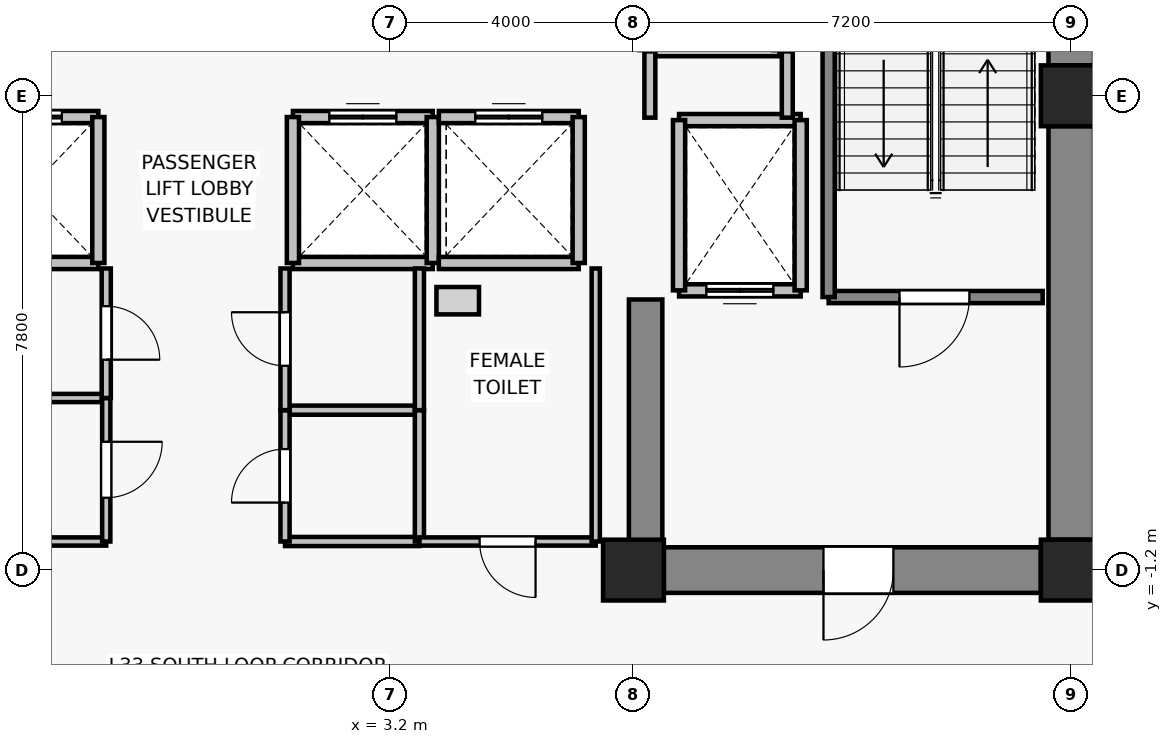
"""IFC4 building model, lengths in metres.
Left out: names, types, materials, properties, quantities, classifications, styles, units other than length and angle.
Written with IfcOpenShell. Run it as: python <this file> out.ifc"""

import sys

from ifc_helpers import new_model, si_unit, direction, frame, frame_2d, origin, origin_2d, place, context, subcontext, project, spatial, rectangle, extrude, source, transform, mapped, element, fill, save


model = new_model("IFC4")
c1 = context("Model", 3, precision=1e-05, world=origin(), true_north=direction((0.0, 1.0)))
c2 = subcontext(c1, "Body", "Model", "MODEL_VIEW")
j1 = project(units=[si_unit("LENGTHUNIT", "METRE"), si_unit("PLANEANGLEUNIT", "RADIAN")], contexts=[c1])
p1 = place(None, origin())
s1 = spatial("IfcSite", under=j1, at=p1, CompositionType="ELEMENT")
p2 = place(p1, origin())
s2 = spatial("IfcBuilding", under=s1, at=p2, CompositionType="ELEMENT")
p3 = place(p2, frame((0.0, 0.0, 119.8)))
s3 = spatial("IfcBuildingStorey", under=s2, at=p3, CompositionType="ELEMENT", Elevation=119.8)
for number, where, z_axis, x_axis in (
    (1, (7.2, -1.2, 0.0), (0.0, 0.0, 1.0), (1.0, 0.0, 0.0)),
    (2, (14.4, -1.2, 0.0), (0.0, 0.0, 1.0), (1.0, 0.0, 0.0)),
    (3, (14.4, 6.6, 0.0), (0.0, 0.0, 1.0), (1.0, 0.0, 0.0)),
):
    element("IfcColumn", number, at=place(p3, frame(where, z_axis=z_axis, x_axis=x_axis)), inside=s3, PredefinedType="COLUMN", context=c2, shape_type="SweptSolid", body=[
        extrude(rectangle(XDim=1.0, YDim=1.0, at=origin_2d()), origin(), (0.0, 0.0, 1.0), 3.3),
    ])
p4 = place(p3, frame((14.4, -0.7, 0.0), z_axis=(0.0, 0.0, 1.0), x_axis=(0.0, 1.0, 0.0)))
e4 = element("IfcWall", 4, at=p4, inside=s3, PredefinedType="SHEAR", context=c2, shape_type="SweptSolid", body=[
    extrude(rectangle(XDim=6.8, YDim=0.75, at=frame_2d((3.4, 0.0))), origin(), (0.0, 0.0, 1.0), 3.075),
])
p5 = place(p3, frame((14.4, 7.1, 0.0), z_axis=(0.0, 0.0, 1.0), x_axis=(0.0, 1.0, 0.0)))
e5 = element("IfcWall", 5, at=p5, inside=s3, PredefinedType="SHEAR", context=c2, shape_type="SweptSolid", body=[
    extrude(rectangle(XDim=5.9, YDim=0.75, at=frame_2d((2.95, 0.0))), origin(), (0.0, 0.0, 1.0), 3.075),
])
p6 = place(p3, frame((13.9, -1.2, 0.0), z_axis=(0.0, 0.0, 1.0), x_axis=(-1.0, 0.0, 0.0)))
e6 = element("IfcWall", 6, at=p6, inside=s3, PredefinedType="SHEAR", context=c2, shape_type="SweptSolid", body=[
    extrude(rectangle(XDim=6.2, YDim=0.75, at=frame_2d((3.1, 0.0))), origin(), (0.0, 0.0, 1.0), 3.075),
])
p7 = place(p6, frame((2.425, 0.0, 0.0)))
e7 = element("IfcOpeningElement", 7, at=p7, cuts=e6, PredefinedType="OPENING", context=c2, shape_type="SweptSolid", body=[
    extrude(rectangle(XDim=1.15, YDim=2.15, at=frame_2d((0.575, 1.075))), frame((0.0, 0.385, 0.0), z_axis=(0.0, -1.0, 0.0), x_axis=(1.0, 0.0, 0.0)), (0.0, 0.0, 1.0), 0.77),
])
p8 = place(p3, frame((7.4, -0.825, 0.0), z_axis=(0.0, 0.0, 1.0), x_axis=(0.0, 1.0, 0.0)))
e8 = element("IfcWall", 8, at=p8, inside=s3, PredefinedType="SHEAR", context=c2, shape_type="SweptSolid", body=[
    extrude(rectangle(XDim=4.075, YDim=0.55, at=frame_2d((2.038, 0.0))), origin(), (0.0, 0.0, 1.0), 3.075),
])
p9 = place(p3, frame((9.95, 3.4, 0.0), z_axis=(0.0, 0.0, 1.0), x_axis=(-1.0, 0.0, 0.0)))
e9 = element("IfcWall", 9, at=p9, inside=s3, PredefinedType="SOLIDWALL", context=c2, shape_type="SweptSolid", body=[
    extrude(rectangle(XDim=2.0, YDim=0.2, at=frame_2d((1.0, 0.0))), origin(), (0.0, 0.0, 1.0), 3.075),
])
p10 = place(p9, frame((0.45, 0.0, 0.0)))
e10 = element("IfcOpeningElement", 10, at=p10, cuts=e9, PredefinedType="OPENING", context=c2, shape_type="SweptSolid", body=[
    extrude(rectangle(XDim=1.1, YDim=2.2, at=frame_2d((0.55, 1.1))), frame((0.0, 0.11, 0.0), z_axis=(0.0, -1.0, 0.0), x_axis=(1.0, 0.0, 0.0)), (0.0, 0.0, 1.0), 0.22),
])
p11 = place(p3, frame((7.95, 6.2, 0.0), z_axis=(0.0, 0.0, 1.0), x_axis=(1.0, 0.0, 0.0)))
e11 = element("IfcWall", 11, at=p11, inside=s3, PredefinedType="SOLIDWALL", context=c2, shape_type="SweptSolid", body=[
    extrude(rectangle(XDim=2.0, YDim=0.2, at=frame_2d((1.0, 0.0))), origin(), (0.0, 0.0, 1.0), 3.075),
])
for number, where, z_axis, x_axis in (
    (12, (7.95, 3.4, 0.0), (0.0, 0.0, 1.0), (0.0, 1.0, 0.0)),
    (13, (9.95, 6.2, 0.0), (0.0, 0.0, 1.0), (0.0, -1.0, 0.0)),
):
    element("IfcWall", number, at=place(p3, frame(where, z_axis=z_axis, x_axis=x_axis)), inside=s3, PredefinedType="SOLIDWALL", context=c2, shape_type="SweptSolid", body=[
        extrude(rectangle(XDim=2.8, YDim=0.2, at=frame_2d((1.4, 0.0))), origin(), (0.0, 0.0, 1.0), 3.075),
    ])
p12 = place(p3, frame((-1.6, 3.85, 0.0), z_axis=(0.0, 0.0, 1.0), x_axis=(-1.0, 0.0, 0.0)))
e14 = element("IfcWall", 14, at=p12, inside=s3, PredefinedType="SOLIDWALL", context=c2, shape_type="SweptSolid", body=[
    extrude(rectangle(XDim=2.3, YDim=0.2, at=frame_2d((1.15, 0.0))), origin(), (0.0, 0.0, 1.0), 3.075),
])
p13 = place(p3, frame((-3.9, 6.25, 0.0), z_axis=(0.0, 0.0, 1.0), x_axis=(1.0, 0.0, 0.0)))
e15 = element("IfcWall", 15, at=p13, inside=s3, PredefinedType="SOLIDWALL", context=c2, shape_type="SweptSolid", body=[
    extrude(rectangle(XDim=2.3, YDim=0.2, at=frame_2d((1.15, 0.0))), origin(), (0.0, 0.0, 1.0), 3.075),
])
p14 = place(p13, frame((0.6, 0.0, 0.0)))
e16 = element("IfcOpeningElement", 16, at=p14, cuts=e15, PredefinedType="OPENING", context=c2, shape_type="SweptSolid", body=[
    extrude(rectangle(XDim=1.1, YDim=2.2, at=frame_2d((0.55, 1.1))), frame((0.0, 0.11, 0.0), z_axis=(0.0, -1.0, 0.0), x_axis=(1.0, 0.0, 0.0)), (0.0, 0.0, 1.0), 0.22),
])
p15 = place(p3, frame((-1.6, 6.25, 0.0), z_axis=(0.0, 0.0, 1.0), x_axis=(0.0, -1.0, 0.0)))
e17 = element("IfcWall", 17, at=p15, inside=s3, PredefinedType="SOLIDWALL", context=c2, shape_type="SweptSolid", body=[
    extrude(rectangle(XDim=2.4, YDim=0.2, at=frame_2d((1.2, 0.0))), origin(), (0.0, 0.0, 1.0), 3.075),
])
p16 = place(p3, frame((3.9, 3.85, 0.0), z_axis=(0.0, 0.0, 1.0), x_axis=(-1.0, 0.0, 0.0)))
e18 = element("IfcWall", 18, at=p16, inside=s3, PredefinedType="SOLIDWALL", context=c2, shape_type="SweptSolid", body=[
    extrude(rectangle(XDim=2.3, YDim=0.2, at=frame_2d((1.15, 0.0))), origin(), (0.0, 0.0, 1.0), 3.075),
])
p17 = place(p3, frame((1.6, 6.25, 0.0), z_axis=(0.0, 0.0, 1.0), x_axis=(1.0, 0.0, 0.0)))
e19 = element("IfcWall", 19, at=p17, inside=s3, PredefinedType="SOLIDWALL", context=c2, shape_type="SweptSolid", body=[
    extrude(rectangle(XDim=2.3, YDim=0.2, at=frame_2d((1.15, 0.0))), origin(), (0.0, 0.0, 1.0), 3.075),
])
p18 = place(p17, frame((0.6, 0.0, 0.0)))
e20 = element("IfcOpeningElement", 20, at=p18, cuts=e19, PredefinedType="OPENING", context=c2, shape_type="SweptSolid", body=[
    extrude(rectangle(XDim=1.1, YDim=2.2, at=frame_2d((0.55, 1.1))), frame((0.0, 0.11, 0.0), z_axis=(0.0, -1.0, 0.0), x_axis=(1.0, 0.0, 0.0)), (0.0, 0.0, 1.0), 0.22),
])
for number, where, z_axis, x_axis in (
    (21, (1.6, 3.85, 0.0), (0.0, 0.0, 1.0), (0.0, 1.0, 0.0)),
    (22, (3.9, 6.25, 0.0), (0.0, 0.0, 1.0), (0.0, -1.0, 0.0)),
):
    element("IfcWall", number, at=place(p3, frame(where, z_axis=z_axis, x_axis=x_axis)), inside=s3, PredefinedType="SOLIDWALL", context=c2, shape_type="SweptSolid", body=[
        extrude(rectangle(XDim=2.4, YDim=0.2, at=frame_2d((1.2, 0.0))), origin(), (0.0, 0.0, 1.0), 3.075),
    ])
p19 = place(p3, frame((6.3, 3.85, 0.0), z_axis=(0.0, 0.0, 1.0), x_axis=(-1.0, 0.0, 0.0)))
e23 = element("IfcWall", 23, at=p19, inside=s3, PredefinedType="SOLIDWALL", context=c2, shape_type="SweptSolid", body=[
    extrude(rectangle(XDim=2.3, YDim=0.2, at=frame_2d((1.15, 0.0))), origin(), (0.0, 0.0, 1.0), 3.075),
])
p20 = place(p3, frame((4.0, 6.25, 0.0), z_axis=(0.0, 0.0, 1.0), x_axis=(1.0, 0.0, 0.0)))
e24 = element("IfcWall", 24, at=p20, inside=s3, PredefinedType="SOLIDWALL", context=c2, shape_type="SweptSolid", body=[
    extrude(rectangle(XDim=2.3, YDim=0.2, at=frame_2d((1.15, 0.0))), origin(), (0.0, 0.0, 1.0), 3.075),
])
p21 = place(p20, frame((0.6, 0.0, 0.0)))
e25 = element("IfcOpeningElement", 25, at=p21, cuts=e24, PredefinedType="OPENING", context=c2, shape_type="SweptSolid", body=[
    extrude(rectangle(XDim=1.1, YDim=2.2, at=frame_2d((0.55, 1.1))), frame((0.0, 0.11, 0.0), z_axis=(0.0, -1.0, 0.0), x_axis=(1.0, 0.0, 0.0)), (0.0, 0.0, 1.0), 0.22),
])
p22 = place(p3, frame((6.3, 6.25, 0.0), z_axis=(0.0, 0.0, 1.0), x_axis=(0.0, -1.0, 0.0)))
e26 = element("IfcWall", 26, at=p22, inside=s3, PredefinedType="SOLIDWALL", context=c2, shape_type="SweptSolid", body=[
    extrude(rectangle(XDim=2.4, YDim=0.2, at=frame_2d((1.2, 0.0))), origin(), (0.0, 0.0, 1.0), 3.075),
])
p23 = place(p3, frame((9.6, 7.35, 0.0), z_axis=(0.0, 0.0, 1.0), x_axis=(-1.0, 0.0, 0.0)))
e27 = element("IfcWall", 27, at=p23, inside=s3, PredefinedType="SOLIDWALL", context=c2, shape_type="SweptSolid", body=[
    extrude(rectangle(XDim=2.2, YDim=0.2, at=frame_2d((1.1, 0.0))), origin(), (0.0, 0.0, 1.0), 2.515),
])
p24 = place(p3, frame((13.93, 3.29, 0.0), z_axis=(0.0, 0.0, 1.0), x_axis=(-1.0, 0.0, 0.0)))
e28 = element("IfcWall", 28, at=p24, inside=s3, PredefinedType="SOLIDWALL", context=c2, shape_type="SweptSolid", body=[
    extrude(rectangle(XDim=3.52, YDim=0.2, at=frame_2d((1.76, 0.0))), origin(), (0.0, 0.0, 1.0), 3.075),
])
p25 = place(p24, frame((1.205, 0.0, 0.0)))
e29 = element("IfcOpeningElement", 29, at=p25, cuts=e28, PredefinedType="OPENING", context=c2, shape_type="SweptSolid", body=[
    extrude(rectangle(XDim=1.15, YDim=2.15, at=frame_2d((0.575, 1.075))), frame((0.0, 0.11, 0.0), z_axis=(0.0, -1.0, 0.0), x_axis=(1.0, 0.0, 0.0)), (0.0, 0.0, 1.0), 0.22),
])
p26 = place(p3, frame((10.41, 3.29, 0.0), z_axis=(0.0, 0.0, 1.0), x_axis=(0.0, 1.0, 0.0)))
e30 = element("IfcWall", 30, at=p26, inside=s3, PredefinedType="SOLIDWALL", context=c2, shape_type="SweptSolid", body=[
    extrude(rectangle(XDim=8.84, YDim=0.2, at=frame_2d((4.42, 0.0))), origin(), (0.0, 0.0, 1.0), 3.075),
])
p27 = place(p3, frame((7.47, 6.24, 0.0), z_axis=(0.0, 0.0, 1.0), x_axis=(0.0, 1.0, 0.0)))
e31 = element("IfcWall", 31, at=p27, inside=s3, PredefinedType="PARTITIONING", context=c2, shape_type="SweptSolid", body=[
    extrude(rectangle(XDim=1.09, YDim=0.18, at=frame_2d((0.545, 0.0))), origin(), (0.0, 0.0, 1.0), 2.515),
])
p28 = place(p3, frame((9.73, 7.33, 0.0), z_axis=(0.0, 0.0, 1.0), x_axis=(0.0, -1.0, 0.0)))
e32 = element("IfcWall", 32, at=p28, inside=s3, PredefinedType="PARTITIONING", context=c2, shape_type="SweptSolid", body=[
    extrude(rectangle(XDim=1.09, YDim=0.18, at=frame_2d((0.545, 0.0))), origin(), (0.0, 0.0, 1.0), 3.075),
])
for number, where, z_axis, x_axis in (
    (33, (-1.47, -0.73, 0.0), (0.0, 0.0, 1.0), (-1.0, 0.0, 0.0)),
    (34, (-3.47, 1.63, 0.0), (0.0, 0.0, 1.0), (1.0, 0.0, 0.0)),
):
    element("IfcWall", number, at=place(p3, frame(where, z_axis=z_axis, x_axis=x_axis)), inside=s3, PredefinedType="PARTITIONING", context=c2, shape_type="SweptSolid", body=[
        extrude(rectangle(XDim=2.0, YDim=0.135, at=frame_2d((1.0, 0.0))), origin(), (0.0, 0.0, 1.0), 3.075),
    ])
p29 = place(p3, frame((-1.47, 1.63, 0.0), z_axis=(0.0, 0.0, 1.0), x_axis=(0.0, -1.0, 0.0)))
e35 = element("IfcWall", 35, at=p29, inside=s3, PredefinedType="PARTITIONING", context=c2, shape_type="SweptSolid", body=[
    extrude(rectangle(XDim=2.36, YDim=0.135, at=frame_2d((1.18, 0.0))), origin(), (0.0, 0.0, 1.0), 3.075),
])
p30 = place(p29, frame((0.72, 0.0, 0.0)))
e36 = element("IfcOpeningElement", 36, at=p30, cuts=e35, PredefinedType="OPENING", context=c2, shape_type="SweptSolid", body=[
    extrude(rectangle(XDim=0.92, YDim=2.1, at=frame_2d((0.46, 1.05))), frame((0.0, 0.077, 0.0), z_axis=(0.0, -1.0, 0.0), x_axis=(1.0, 0.0, 0.0)), (0.0, 0.0, 1.0), 0.155),
])
p31 = place(p3, frame((-1.47, 3.76, 0.0), z_axis=(0.0, 0.0, 1.0), x_axis=(0.0, -1.0, 0.0)))
e37 = element("IfcWall", 37, at=p31, inside=s3, PredefinedType="PARTITIONING", context=c2, shape_type="SweptSolid", body=[
    extrude(rectangle(XDim=2.13, YDim=0.15, at=frame_2d((1.065, 0.0))), origin(), (0.0, 0.0, 1.0), 3.075),
])
p32 = place(p31, frame((0.62, 0.0, 0.0)))
e38 = element("IfcOpeningElement", 38, at=p32, cuts=e37, PredefinedType="OPENING", context=c2, shape_type="SweptSolid", body=[
    extrude(rectangle(XDim=0.88, YDim=2.1, at=frame_2d((0.44, 1.05))), frame((0.0, 0.085, 0.0), z_axis=(0.0, -1.0, 0.0), x_axis=(1.0, 0.0, 0.0)), (0.0, 0.0, 1.0), 0.17),
])
for number, where, z_axis, x_axis in (
    (39, (3.68, -0.73, 0.0), (0.0, 0.0, 1.0), (-1.0, 0.0, 0.0)),
    (40, (1.47, 1.43, 0.0), (0.0, 0.0, 1.0), (1.0, 0.0, 0.0)),
):
    element("IfcWall", number, at=place(p3, frame(where, z_axis=z_axis, x_axis=x_axis)), inside=s3, PredefinedType="PARTITIONING", context=c2, shape_type="SweptSolid", body=[
        extrude(rectangle(XDim=2.21, YDim=0.15, at=frame_2d((1.105, 0.0))), origin(), (0.0, 0.0, 1.0), 3.075),
    ])
p33 = place(p3, frame((1.47, -0.73, 0.0), z_axis=(0.0, 0.0, 1.0), x_axis=(0.0, 1.0, 0.0)))
e41 = element("IfcWall", 41, at=p33, inside=s3, PredefinedType="PARTITIONING", context=c2, shape_type="SweptSolid", body=[
    extrude(rectangle(XDim=2.16, YDim=0.15, at=frame_2d((1.08, 0.0))), origin(), (0.0, 0.0, 1.0), 3.075),
])
p34 = place(p33, frame((0.64, 0.0, 0.0)))
e42 = element("IfcOpeningElement", 42, at=p34, cuts=e41, PredefinedType="OPENING", context=c2, shape_type="SweptSolid", body=[
    extrude(rectangle(XDim=0.88, YDim=2.1, at=frame_2d((0.44, 1.05))), frame((0.0, 0.085, 0.0), z_axis=(0.0, -1.0, 0.0), x_axis=(1.0, 0.0, 0.0)), (0.0, 0.0, 1.0), 0.17),
])
p35 = place(p3, frame((3.68, 1.43, 0.0), z_axis=(0.0, 0.0, 1.0), x_axis=(0.0, -1.0, 0.0)))
e43 = element("IfcWall", 43, at=p35, inside=s3, PredefinedType="PARTITIONING", context=c2, shape_type="SweptSolid", body=[
    extrude(rectangle(XDim=2.16, YDim=0.15, at=frame_2d((1.08, 0.0))), origin(), (0.0, 0.0, 1.0), 3.075),
])
p36 = place(p3, frame((1.47, 1.43, 0.0), z_axis=(0.0, 0.0, 1.0), x_axis=(0.0, 1.0, 0.0)))
e44 = element("IfcWall", 44, at=p36, inside=s3, PredefinedType="PARTITIONING", context=c2, shape_type="SweptSolid", body=[
    extrude(rectangle(XDim=2.33, YDim=0.15, at=frame_2d((1.165, 0.0))), origin(), (0.0, 0.0, 1.0), 3.075),
])
p37 = place(p36, frame((0.73, 0.0, 0.0)))
e45 = element("IfcOpeningElement", 45, at=p37, cuts=e44, PredefinedType="OPENING", context=c2, shape_type="SweptSolid", body=[
    extrude(rectangle(XDim=0.88, YDim=2.15, at=frame_2d((0.44, 1.075))), frame((0.0, 0.085, 0.0), z_axis=(0.0, -1.0, 0.0), x_axis=(1.0, 0.0, 0.0)), (0.0, 0.0, 1.0), 0.17),
])
p38 = place(p3, frame((3.68, 3.76, 0.0), z_axis=(0.0, 0.0, 1.0), x_axis=(0.0, -1.0, 0.0)))
e46 = element("IfcWall", 46, at=p38, inside=s3, PredefinedType="PARTITIONING", context=c2, shape_type="SweptSolid", body=[
    extrude(rectangle(XDim=2.33, YDim=0.15, at=frame_2d((1.165, 0.0))), origin(), (0.0, 0.0, 1.0), 3.075),
])
p39 = place(p3, frame((6.58, -0.73, 0.0), z_axis=(0.0, 0.0, 1.0), x_axis=(-1.0, 0.0, 0.0)))
e47 = element("IfcWall", 47, at=p39, inside=s3, PredefinedType="PARTITIONING", context=c2, shape_type="SweptSolid", body=[
    extrude(rectangle(XDim=2.9, YDim=0.135, at=frame_2d((1.45, 0.0))), origin(), (0.0, 0.0, 1.0), 3.075),
])
p40 = place(p39, frame((0.99, 0.0, 0.0)))
e48 = element("IfcOpeningElement", 48, at=p40, cuts=e47, PredefinedType="OPENING", context=c2, shape_type="SweptSolid", body=[
    extrude(rectangle(XDim=0.92, YDim=2.1, at=frame_2d((0.46, 1.05))), frame((0.0, 0.077, 0.0), z_axis=(0.0, -1.0, 0.0), x_axis=(1.0, 0.0, 0.0)), (0.0, 0.0, 1.0), 0.155),
])
p41 = place(p3, frame((6.58, 3.76, 0.0), z_axis=(0.0, 0.0, 1.0), x_axis=(0.0, -1.0, 0.0)))
e49 = element("IfcWall", 49, at=p41, inside=s3, PredefinedType="PARTITIONING", context=c2, shape_type="SweptSolid", body=[
    extrude(rectangle(XDim=4.49, YDim=0.135, at=frame_2d((2.245, 0.0))), origin(), (0.0, 0.0, 1.0), 3.075),
])
m1 = source(origin(), c2, "Body", "SweptSolid", [
    extrude(rectangle(XDim=1.1, YDim=2.2, at=frame_2d((0.55, 1.1))), frame((0.0, 0.025, 0.0), z_axis=(0.0, -1.0, 0.0), x_axis=(1.0, 0.0, 0.0)), (0.0, 0.0, 1.0), 0.05),
])
p42 = place(p10, origin())
e50 = element("IfcDoor", 50, at=p42, inside=s3, OperationType="DOUBLE_DOOR_SLIDING", PredefinedType="DOOR", context=c2, shape_type="MappedRepresentation", body=[
    mapped(m1, transform((0.0, 0.0, 0.0), x_axis=(1.0, 0.0, 0.0), y_axis=(0.0, 1.0, 0.0), z_axis=(0.0, 0.0, 1.0), scale=1.0)),
])
fill(e10, e50)
p43 = place(p14, origin())
e51 = element("IfcDoor", 51, at=p43, inside=s3, OperationType="DOUBLE_DOOR_SLIDING", PredefinedType="DOOR", context=c2, shape_type="MappedRepresentation", body=[
    mapped(m1, transform((0.0, 0.0, 0.0), x_axis=(1.0, 0.0, 0.0), y_axis=(0.0, 1.0, 0.0), z_axis=(0.0, 0.0, 1.0), scale=1.0)),
])
fill(e16, e51)
p44 = place(p18, origin())
e52 = element("IfcDoor", 52, at=p44, inside=s3, OperationType="DOUBLE_DOOR_SLIDING", PredefinedType="DOOR", context=c2, shape_type="MappedRepresentation", body=[
    mapped(m1, transform((0.0, 0.0, 0.0), x_axis=(1.0, 0.0, 0.0), y_axis=(0.0, 1.0, 0.0), z_axis=(0.0, 0.0, 1.0), scale=1.0)),
])
fill(e20, e52)
p45 = place(p21, origin())
e53 = element("IfcDoor", 53, at=p45, inside=s3, OperationType="DOUBLE_DOOR_SLIDING", PredefinedType="DOOR", context=c2, shape_type="MappedRepresentation", body=[
    mapped(m1, transform((0.0, 0.0, 0.0), x_axis=(1.0, 0.0, 0.0), y_axis=(0.0, 1.0, 0.0), z_axis=(0.0, 0.0, 1.0), scale=1.0)),
])
fill(e25, e53)
m2 = source(origin(), c2, "Body", "SweptSolid", [
    extrude(rectangle(XDim=1.15, YDim=2.15, at=frame_2d((0.575, 1.075))), frame((0.0, 0.025, 0.0), z_axis=(0.0, -1.0, 0.0), x_axis=(1.0, 0.0, 0.0)), (0.0, 0.0, 1.0), 0.05),
])
p46 = place(p25, origin())
e54 = element("IfcDoor", 54, at=p46, inside=s3, OperationType="SINGLE_SWING_RIGHT", PredefinedType="DOOR", context=c2, shape_type="MappedRepresentation", body=[
    mapped(m2, transform((0.0, 0.0, 0.0), x_axis=(1.0, 0.0, 0.0), y_axis=(0.0, 1.0, 0.0), z_axis=(0.0, 0.0, 1.0), scale=1.0)),
])
fill(e29, e54)
p47 = place(p7, origin())
e55 = element("IfcDoor", 55, at=p47, inside=s3, OperationType="SINGLE_SWING_RIGHT", PredefinedType="DOOR", context=c2, shape_type="MappedRepresentation", body=[
    mapped(m2, transform((0.0, 0.0, 0.0), x_axis=(1.0, 0.0, 0.0), y_axis=(0.0, 1.0, 0.0), z_axis=(0.0, 0.0, 1.0), scale=1.0)),
])
fill(e7, e55)
m3 = source(origin(), c2, "Body", "SweptSolid", [
    extrude(rectangle(XDim=0.92, YDim=2.1, at=frame_2d((0.46, 1.05))), frame((0.0, 0.025, 0.0), z_axis=(0.0, -1.0, 0.0), x_axis=(1.0, 0.0, 0.0)), (0.0, 0.0, 1.0), 0.05),
])
p48 = place(p30, origin())
e56 = element("IfcDoor", 56, at=p48, inside=s3, OperationType="SINGLE_SWING_LEFT", PredefinedType="DOOR", context=c2, shape_type="MappedRepresentation", body=[
    mapped(m3, transform((0.0, 0.0, 0.0), x_axis=(1.0, 0.0, 0.0), y_axis=(0.0, 1.0, 0.0), z_axis=(0.0, 0.0, 1.0), scale=1.0)),
])
fill(e36, e56)
m4 = source(origin(), c2, "Body", "SweptSolid", [
    extrude(rectangle(XDim=0.88, YDim=2.1, at=frame_2d((0.44, 1.05))), frame((0.0, 0.025, 0.0), z_axis=(0.0, -1.0, 0.0), x_axis=(1.0, 0.0, 0.0)), (0.0, 0.0, 1.0), 0.05),
])
p49 = place(p32, origin())
e57 = element("IfcDoor", 57, at=p49, inside=s3, OperationType="SINGLE_SWING_RIGHT", PredefinedType="DOOR", context=c2, shape_type="MappedRepresentation", body=[
    mapped(m4, transform((0.0, 0.0, 0.0), x_axis=(1.0, 0.0, 0.0), y_axis=(0.0, 1.0, 0.0), z_axis=(0.0, 0.0, 1.0), scale=1.0)),
])
fill(e38, e57)
p50 = place(p34, origin())
e58 = element("IfcDoor", 58, at=p50, inside=s3, OperationType="SINGLE_SWING_LEFT", PredefinedType="DOOR", context=c2, shape_type="MappedRepresentation", body=[
    mapped(m4, transform((0.0, 0.0, 0.0), x_axis=(1.0, 0.0, 0.0), y_axis=(0.0, 1.0, 0.0), z_axis=(0.0, 0.0, 1.0), scale=1.0)),
])
fill(e42, e58)
m5 = source(origin(), c2, "Body", "SweptSolid", [
    extrude(rectangle(XDim=0.88, YDim=2.15, at=frame_2d((0.44, 1.075))), frame((0.0, 0.025, 0.0), z_axis=(0.0, -1.0, 0.0), x_axis=(1.0, 0.0, 0.0)), (0.0, 0.0, 1.0), 0.05),
])
p51 = place(p37, origin())
e59 = element("IfcDoor", 59, at=p51, inside=s3, OperationType="SINGLE_SWING_RIGHT", PredefinedType="DOOR", context=c2, shape_type="MappedRepresentation", body=[
    mapped(m5, transform((0.0, 0.0, 0.0), x_axis=(1.0, 0.0, 0.0), y_axis=(0.0, 1.0, 0.0), z_axis=(0.0, 0.0, 1.0), scale=1.0)),
])
fill(e45, e59)
p52 = place(p40, origin())
e60 = element("IfcDoor", 60, at=p52, inside=s3, OperationType="SINGLE_SWING_LEFT", PredefinedType="DOOR", context=c2, shape_type="MappedRepresentation", body=[
    mapped(m3, transform((0.0, 0.0, 0.0), x_axis=(1.0, 0.0, 0.0), y_axis=(0.0, 1.0, 0.0), z_axis=(0.0, 0.0, 1.0), scale=1.0)),
])
fill(e48, e60)
save(model, sys.argv[1])
